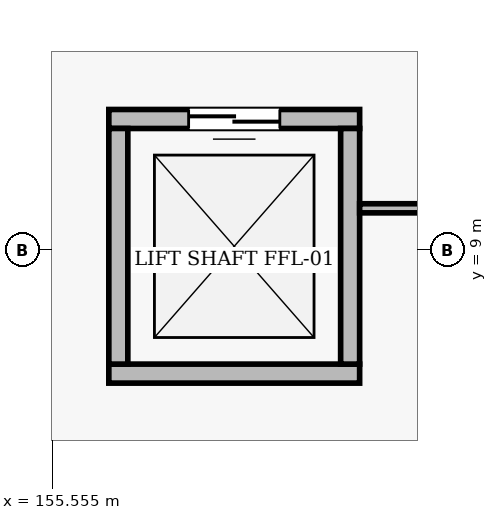
"""IFC4 building model, lengths in metres.
Left out: names, types, materials, properties, quantities, classifications, styles, units other than length and angle.
Written with IfcOpenShell. Run it as: python <this file> out.ifc"""

import sys

from ifc_helpers import new_model, si_unit, direction, frame, frame_2d, origin, place, context, subcontext, project, spatial, rectangle, extrude, element, fill, save


model = new_model("IFC4")
c1 = context("Model", 3, precision=1e-05, world=origin(), true_north=direction((0.0, 1.0)))
c2 = subcontext(c1, "Body", "Model", "MODEL_VIEW")
j1 = project(units=[si_unit("LENGTHUNIT", "METRE"), si_unit("PLANEANGLEUNIT", "RADIAN")], contexts=[c1])
p1 = place(None, origin())
s1 = spatial("IfcSite", under=j1, at=p1, CompositionType="ELEMENT")
p2 = place(p1, origin())
s2 = spatial("IfcBuilding", under=s1, at=p2, CompositionType="ELEMENT")
p3 = place(p2, frame((0.0, 0.0, -5.4)))
s3 = spatial("IfcBuildingStorey", under=s2, at=p3, CompositionType="ELEMENT", Elevation=-5.4)
p4 = place(p3, frame((156.3, 7.375, 0.0), z_axis=(0.0, 0.0, 1.0), x_axis=(1.0, 0.0, 0.0)))
e1 = element("IfcWall", 1, at=p4, inside=s3, PredefinedType="SOLIDWALL", context=c2, shape_type="SweptSolid", body=[
    extrude(rectangle(XDim=3.3, YDim=0.25, at=frame_2d((1.65, 0.0))), origin(), (0.0, 0.0, 1.0), 5.1),
])
p5 = place(p3, frame((159.6, 10.725, 0.0), z_axis=(0.0, 0.0, 1.0), x_axis=(-1.0, 0.0, 0.0)))
e2 = element("IfcWall", 2, at=p5, inside=s3, PredefinedType="SOLIDWALL", context=c2, shape_type="SweptSolid", body=[
    extrude(rectangle(XDim=3.3, YDim=0.25, at=frame_2d((1.65, 0.0))), origin(), (0.0, 0.0, 1.0), 5.1),
])
p6 = place(p5, frame((1.05, 0.0, 0.0)))
e3 = element("IfcOpeningElement", 3, at=p6, cuts=e2, PredefinedType="OPENING", context=c2, shape_type="SweptSolid", body=[
    extrude(rectangle(XDim=1.2, YDim=2.25, at=frame_2d((0.6, 1.125))), frame((0.0, 0.135, 0.0), z_axis=(0.0, -1.0, 0.0), x_axis=(1.0, 0.0, 0.0)), (0.0, 0.0, 1.0), 0.27),
])
for number, where, z_axis, x_axis in (
    (4, (156.425, 10.6, 0.0), (0.0, 0.0, 1.0), (0.0, -1.0, 0.0)),
    (5, (159.475, 7.5, 0.0), (0.0, 0.0, 1.0), (0.0, 1.0, 0.0)),
):
    element("IfcWall", number, at=place(p3, frame(where, z_axis=z_axis, x_axis=x_axis)), inside=s3, PredefinedType="SOLIDWALL", context=c2, shape_type="SweptSolid", body=[
        extrude(rectangle(XDim=3.1, YDim=0.25, at=frame_2d((1.55, 0.0))), origin(), (0.0, 0.0, 1.0), 5.1),
    ])
p7 = place(p3, frame((162.9, 9.55, 0.0), z_axis=(0.0, 0.0, 1.0), x_axis=(-1.0, 0.0, 0.0)))
e6 = element("IfcWall", 6, at=p7, inside=s3, PredefinedType="PARTITIONING", context=c2, shape_type="SweptSolid", body=[
    extrude(rectangle(XDim=3.3, YDim=0.12, at=frame_2d((1.65, 0.0))), origin(), (0.0, 0.0, 1.0), 4.332),
])
p8 = place(p6, origin())
e7 = element("IfcDoor", 7, at=p8, inside=s3, OperationType="DOUBLE_DOOR_SLIDING", PredefinedType="DOOR", context=c2, shape_type="SweptSolid", body=[
    extrude(rectangle(XDim=1.2, YDim=2.25, at=frame_2d((0.6, 1.125))), frame((0.0, 0.025, 0.0), z_axis=(0.0, -1.0, 0.0), x_axis=(1.0, 0.0, 0.0)), (0.0, 0.0, 1.0), 0.05),
])
fill(e3, e7)
save(model, sys.argv[1])
